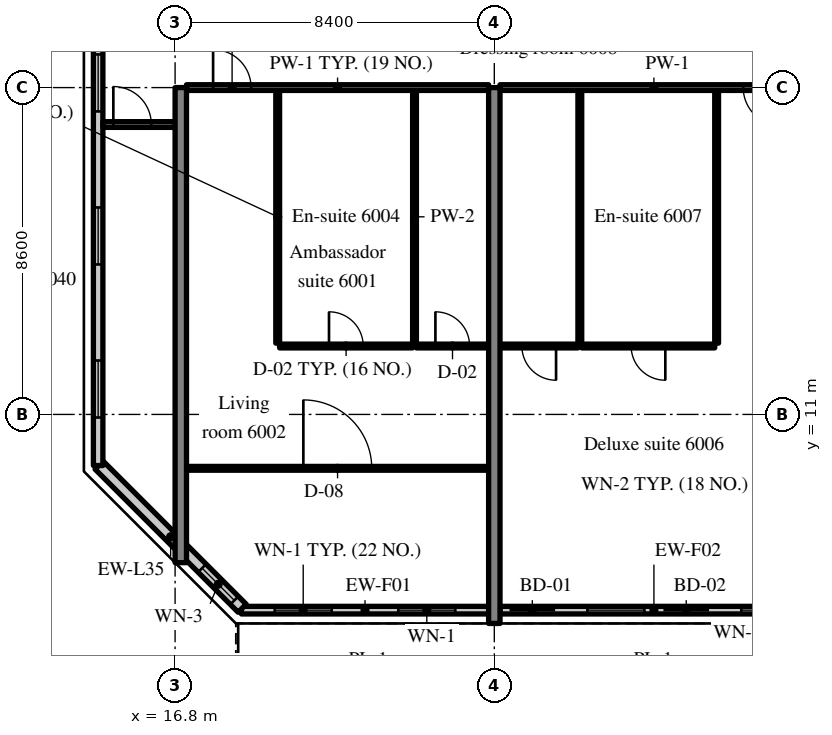
"""IFC4 building model, lengths in metres.
Left out: names, types, materials, properties, quantities, classifications, styles, units other than length and angle.
Written with IfcOpenShell. Run it as: python <this file> out.ifc"""

import sys

from ifc_helpers import new_model, si_unit, direction, frame, frame_2d, origin, place, context, subcontext, project, spatial, rectangle, extrude, source, transform, mapped, element, fill, save


model = new_model("IFC4")
c1 = context("Model", 3, precision=1e-05, world=origin(), true_north=direction((0.0, 1.0)))
c2 = subcontext(c1, "Body", "Model", "MODEL_VIEW")
j1 = project(units=[si_unit("LENGTHUNIT", "METRE"), si_unit("PLANEANGLEUNIT", "RADIAN")], contexts=[c1])
p1 = place(None, origin())
s1 = spatial("IfcSite", under=j1, at=p1, CompositionType="ELEMENT")
p2 = place(p1, origin())
s2 = spatial("IfcBuilding", under=s1, at=p2, CompositionType="ELEMENT")
p3 = place(p2, frame((0.0, 0.0, 249.1)))
s3 = spatial("IfcBuildingStorey", under=s2, at=p3, CompositionType="ELEMENT", Elevation=249.1)
m1 = source(origin(), c2, "Body", "SweptSolid", [
    extrude(rectangle(XDim=12.5, YDim=0.3, at=frame_2d((6.25, 0.0))), origin(), (0.0, 0.0, 1.0), 3.62),
])
p4 = place(p3, frame((16.95, 7.1, 0.0), z_axis=(0.0, 0.0, 1.0), x_axis=(0.0, 1.0, 0.0)))
e1 = element("IfcWall", 1, at=p4, inside=s3, PredefinedType="SHEAR", context=c2, shape_type="MappedRepresentation", body=[
    mapped(m1, transform((0.0, 0.0, 0.0), scale=1.0)),
])
m2 = source(origin(), c2, "Body", "SweptSolid", [
    extrude(rectangle(XDim=14.1, YDim=0.3, at=frame_2d((7.05, 0.0))), origin(), (0.0, 0.0, 1.0), 3.62),
])
p5 = place(p3, frame((25.2, 5.5, 0.0), z_axis=(0.0, 0.0, 1.0), x_axis=(0.0, 1.0, 0.0)))
e2 = element("IfcWall", 2, at=p5, inside=s3, PredefinedType="SHEAR", context=c2, shape_type="MappedRepresentation", body=[
    mapped(m2, transform((0.0, 0.0, 0.0), scale=1.0)),
])
m3 = source(origin(), c2, "Body", "SweptSolid", [
    extrude(rectangle(XDim=6.505, YDim=0.2, at=frame_2d((3.252, 0.0))), origin(), (0.0, 0.0, 1.0), 3.02),
])
p6 = place(p3, frame((18.545, 5.85, 0.0), z_axis=(0.0, 0.0, 1.0), x_axis=(1.0, 0.0, 0.0)))
e3 = element("IfcWall", 3, at=p6, inside=s3, PredefinedType="SOLIDWALL", context=c2, shape_type="MappedRepresentation", body=[
    mapped(m3, transform((0.0, 0.0, 0.0), scale=1.0)),
])
m4 = source(origin(), c2, "Body", "SweptSolid", [
    extrude(rectangle(XDim=1.5, YDim=1.5, at=frame_2d((0.75, 0.75))), frame((0.0, 0.11, 0.0), z_axis=(0.0, -1.0, 0.0), x_axis=(1.0, 0.0, 0.0)), (0.0, 0.0, 1.0), 0.22),
])
p7 = place(p6, frame((0.876, 0.0, 0.9)))
e4 = element("IfcOpeningElement", 4, at=p7, cuts=e3, PredefinedType="OPENING", context=c2, shape_type="MappedRepresentation", body=[
    mapped(m4, transform((0.0, 0.0, 0.0), scale=1.0)),
])
p8 = place(p6, frame((4.129, 0.0, 0.9)))
e5 = element("IfcOpeningElement", 5, at=p8, cuts=e3, PredefinedType="OPENING", context=c2, shape_type="MappedRepresentation", body=[
    mapped(m4, transform((0.0, 0.0, 0.0), scale=1.0)),
])
m5 = source(origin(), c2, "Body", "SweptSolid", [
    extrude(rectangle(XDim=8.1, YDim=0.2, at=frame_2d((4.05, 0.0))), origin(), (0.0, 0.0, 1.0), 3.02),
])
p9 = place(p3, frame((25.35, 5.85, 0.0), z_axis=(0.0, 0.0, 1.0), x_axis=(1.0, 0.0, 0.0)))
e6 = element("IfcWall", 6, at=p9, inside=s3, PredefinedType="SOLIDWALL", context=c2, shape_type="MappedRepresentation", body=[
    mapped(m5, transform((0.0, 0.0, 0.0), scale=1.0)),
])
m6 = source(origin(), c2, "Body", "SweptSolid", [
    extrude(rectangle(XDim=1.2, YDim=2.4, at=frame_2d((0.6, 1.2))), frame((0.0, 0.11, 0.0), z_axis=(0.0, -1.0, 0.0), x_axis=(1.0, 0.0, 0.0)), (0.0, 0.0, 1.0), 0.22),
])
p10 = place(p9, frame((0.25, 0.0, 0.0)))
e7 = element("IfcOpeningElement", 7, at=p10, cuts=e6, PredefinedType="OPENING", context=c2, shape_type="MappedRepresentation", body=[
    mapped(m6, transform((0.0, 0.0, 0.0), scale=1.0)),
])
p11 = place(p9, frame((2.3, 0.0, 0.9)))
e8 = element("IfcOpeningElement", 8, at=p11, cuts=e6, PredefinedType="OPENING", context=c2, shape_type="MappedRepresentation", body=[
    mapped(m4, transform((0.0, 0.0, 0.0), scale=1.0)),
])
p12 = place(p9, frame((4.3, 0.0, 0.0)))
e9 = element("IfcOpeningElement", 9, at=p12, cuts=e6, PredefinedType="OPENING", context=c2, shape_type="MappedRepresentation", body=[
    mapped(m6, transform((0.0, 0.0, 0.0), scale=1.0)),
])
p13 = place(p9, frame((6.35, 0.0, 0.9)))
e10 = element("IfcOpeningElement", 10, at=p13, cuts=e6, PredefinedType="OPENING", context=c2, shape_type="MappedRepresentation", body=[
    mapped(m4, transform((0.0, 0.0, 0.0), scale=1.0)),
])
m7 = source(origin(), c2, "Body", "SweptSolid", [
    extrude(rectangle(XDim=5.326, YDim=0.3, at=frame_2d((2.663, 0.0))), origin(), (0.0, 0.0, 1.0), 3.62),
])
p14 = place(p3, frame((14.8, 9.666, 0.0), z_axis=(0.0, 0.0, 1.0), x_axis=(0.707083859269, -0.707129702361, 0.0)))
e11 = element("IfcWall", 11, at=p14, inside=s3, PredefinedType="SOLIDWALL", context=c2, shape_type="MappedRepresentation", body=[
    mapped(m7, transform((0.0, 0.0, 0.0), scale=1.0)),
])
m8 = source(origin(), c2, "Body", "SweptSolid", [
    extrude(rectangle(XDim=1.2, YDim=1.5, at=frame_2d((0.6, 0.75))), frame((0.0, 0.16, 0.0), z_axis=(0.0, -1.0, 0.0), x_axis=(1.0, 0.0, 0.0)), (0.0, 0.0, 1.0), 0.32),
])
p15 = place(p14, frame((3.833, 0.0, 0.9)))
e12 = element("IfcOpeningElement", 12, at=p15, cuts=e11, PredefinedType="OPENING", context=c2, shape_type="MappedRepresentation", body=[
    mapped(m8, transform((0.0, 0.0, 0.0), scale=1.0)),
])
m9 = source(origin(), c2, "Body", "SweptSolid", [
    extrude(rectangle(XDim=28.189, YDim=0.25, at=frame_2d((14.095, 0.0))), origin(), (0.0, 0.0, 1.0), 3.62),
])
p16 = place(p3, frame((14.775, 37.845, 0.0), z_axis=(0.0, 0.0, 1.0), x_axis=(0.0, -1.0, 0.0)))
e13 = element("IfcWall", 13, at=p16, inside=s3, PredefinedType="SOLIDWALL", context=c2, shape_type="MappedRepresentation", body=[
    mapped(m9, transform((0.0, 0.0, 0.0), scale=1.0)),
])
m10 = source(origin(), c2, "Body", "SweptSolid", [
    extrude(rectangle(XDim=1.5, YDim=1.5, at=frame_2d((0.75, 0.75))), frame((0.0, 0.135, 0.0), z_axis=(0.0, -1.0, 0.0), x_axis=(1.0, 0.0, 0.0)), (0.0, 0.0, 1.0), 0.27),
])
p17 = place(p16, frame((1.263, 0.0, 0.9)))
e14 = element("IfcOpeningElement", 14, at=p17, cuts=e13, PredefinedType="OPENING", context=c2, shape_type="MappedRepresentation", body=[
    mapped(m10, transform((0.0, 0.0, 0.0), scale=1.0)),
])
p18 = place(p16, frame((5.291, 0.0, 0.9)))
e15 = element("IfcOpeningElement", 15, at=p18, cuts=e13, PredefinedType="OPENING", context=c2, shape_type="MappedRepresentation", body=[
    mapped(m10, transform((0.0, 0.0, 0.0), scale=1.0)),
])
p19 = place(p16, frame((9.318, 0.0, 0.9)))
e16 = element("IfcOpeningElement", 16, at=p19, cuts=e13, PredefinedType="OPENING", context=c2, shape_type="MappedRepresentation", body=[
    mapped(m10, transform((0.0, 0.0, 0.0), scale=1.0)),
])
p20 = place(p16, frame((13.345, 0.0, 0.9)))
e17 = element("IfcOpeningElement", 17, at=p20, cuts=e13, PredefinedType="OPENING", context=c2, shape_type="MappedRepresentation", body=[
    mapped(m10, transform((0.0, 0.0, 0.0), scale=1.0)),
])
p21 = place(p16, frame((17.372, 0.0, 0.9)))
e18 = element("IfcOpeningElement", 18, at=p21, cuts=e13, PredefinedType="OPENING", context=c2, shape_type="MappedRepresentation", body=[
    mapped(m10, transform((0.0, 0.0, 0.0), scale=1.0)),
])
p22 = place(p16, frame((21.399, 0.0, 0.9)))
e19 = element("IfcOpeningElement", 19, at=p22, cuts=e13, PredefinedType="OPENING", context=c2, shape_type="MappedRepresentation", body=[
    mapped(m10, transform((0.0, 0.0, 0.0), scale=1.0)),
])
p23 = place(p16, frame((25.426, 0.0, 0.9)))
e20 = element("IfcOpeningElement", 20, at=p23, cuts=e13, PredefinedType="OPENING", context=c2, shape_type="MappedRepresentation", body=[
    mapped(m10, transform((0.0, 0.0, 0.0), scale=1.0)),
])
m11 = source(origin(), c2, "Body", "SweptSolid", [
    extrude(rectangle(XDim=6.65, YDim=0.1, at=frame_2d((3.325, 0.0))), origin(), (0.0, 0.0, 1.0), 3.62),
])
for number, where, z_axis, x_axis in (
    (21, (19.5, 12.875, 0.0), (0.0, 0.0, 1.0), (0.0, 1.0, 0.0)),
    (22, (23.1, 12.875, 0.0), (0.0, 0.0, 1.0), (0.0, 1.0, 0.0)),
):
    element("IfcWall", number, at=place(p3, frame(where, z_axis=z_axis, x_axis=x_axis)), inside=s3, PredefinedType="PARTITIONING", context=c2, shape_type="MappedRepresentation", body=[
        mapped(m11, transform((0.0, 0.0, 0.0), scale=1.0)),
    ])
m12 = source(origin(), c2, "Body", "SweptSolid", [
    extrude(rectangle(XDim=3.5, YDim=0.1, at=frame_2d((1.75, 0.0))), origin(), (0.0, 0.0, 1.0), 3.62),
])
p24 = place(p3, frame((19.55, 12.8, 0.0), z_axis=(0.0, 0.0, 1.0), x_axis=(1.0, 0.0, 0.0)))
e23 = element("IfcWall", 23, at=p24, inside=s3, PredefinedType="PARTITIONING", context=c2, shape_type="MappedRepresentation", body=[
    mapped(m12, transform((0.0, 0.0, 0.0), scale=1.0)),
])
m13 = source(origin(), c2, "Body", "SweptSolid", [
    extrude(rectangle(XDim=0.9, YDim=2.1, at=frame_2d((0.45, 1.05))), frame((0.0, 0.06, 0.0), z_axis=(0.0, -1.0, 0.0), x_axis=(1.0, 0.0, 0.0)), (0.0, 0.0, 1.0), 0.12),
])
p25 = place(p24, frame((1.3, 0.0, 0.0)))
e24 = element("IfcOpeningElement", 24, at=p25, cuts=e23, PredefinedType="OPENING", context=c2, shape_type="MappedRepresentation", body=[
    mapped(m13, transform((0.0, 0.0, 0.0), scale=1.0)),
])
m14 = source(origin(), c2, "Body", "SweptSolid", [
    extrude(rectangle(XDim=1.9, YDim=0.1, at=frame_2d((0.95, 0.0))), origin(), (0.0, 0.0, 1.0), 3.62),
])
p26 = place(p3, frame((23.15, 12.8, 0.0), z_axis=(0.0, 0.0, 1.0), x_axis=(1.0, 0.0, 0.0)))
e25 = element("IfcWall", 25, at=p26, inside=s3, PredefinedType="PARTITIONING", context=c2, shape_type="MappedRepresentation", body=[
    mapped(m14, transform((0.0, 0.0, 0.0), scale=1.0)),
])
p27 = place(p26, frame((0.5, 0.0, 0.0)))
e26 = element("IfcOpeningElement", 26, at=p27, cuts=e25, PredefinedType="OPENING", context=c2, shape_type="MappedRepresentation", body=[
    mapped(m13, transform((0.0, 0.0, 0.0), scale=1.0)),
])
m15 = source(origin(), c2, "Body", "SweptSolid", [
    extrude(rectangle(XDim=7.95, YDim=0.1, at=frame_2d((3.975, 0.0))), origin(), (0.0, 0.0, 1.0), 3.62),
])
p28 = place(p3, frame((17.1, 9.582, 0.0), z_axis=(0.0, 0.0, 1.0), x_axis=(1.0, 0.0, 0.0)))
e27 = element("IfcWall", 27, at=p28, inside=s3, PredefinedType="PARTITIONING", context=c2, shape_type="MappedRepresentation", body=[
    mapped(m15, transform((0.0, 0.0, 0.0), scale=1.0)),
])
m16 = source(origin(), c2, "Body", "SweptSolid", [
    extrude(rectangle(XDim=1.8, YDim=2.1, at=frame_2d((0.9, 1.05))), frame((0.0, 0.06, 0.0), z_axis=(0.0, -1.0, 0.0), x_axis=(1.0, 0.0, 0.0)), (0.0, 0.0, 1.0), 0.12),
])
p29 = place(p28, frame((3.075, 0.0, 0.0)))
e28 = element("IfcOpeningElement", 28, at=p29, cuts=e27, PredefinedType="OPENING", context=c2, shape_type="MappedRepresentation", body=[
    mapped(m16, transform((0.0, 0.0, 0.0), scale=1.0)),
])
m17 = source(origin(), c2, "Body", "SweptSolid", [
    extrude(rectangle(XDim=7.95, YDim=0.15, at=frame_2d((3.975, 0.0))), origin(), (0.0, 0.0, 1.0), 2.92),
])
p30 = place(p3, frame((17.1, 19.6, 0.0), z_axis=(0.0, 0.0, 1.0), x_axis=(1.0, 0.0, 0.0)))
e29 = element("IfcWall", 29, at=p30, inside=s3, PredefinedType="PARTITIONING", context=c2, shape_type="MappedRepresentation", body=[
    mapped(m17, transform((0.0, 0.0, 0.0), scale=1.0)),
])
m18 = source(origin(), c2, "Body", "SweptSolid", [
    extrude(rectangle(XDim=1.0, YDim=2.1, at=frame_2d((0.5, 1.05))), frame((0.0, 0.085, 0.0), z_axis=(0.0, -1.0, 0.0), x_axis=(1.0, 0.0, 0.0)), (0.0, 0.0, 1.0), 0.17),
])
p31 = place(p30, frame((0.7, 0.0, 0.0)))
e30 = element("IfcOpeningElement", 30, at=p31, cuts=e29, PredefinedType="OPENING", context=c2, shape_type="MappedRepresentation", body=[
    mapped(m18, transform((0.0, 0.0, 0.0), scale=1.0)),
])
for number, where, z_axis, x_axis in (
    (31, (31.05, 12.875, 0.0), (0.0, 0.0, 1.0), (0.0, 1.0, 0.0)),
    (32, (27.45, 12.875, 0.0), (0.0, 0.0, 1.0), (0.0, 1.0, 0.0)),
):
    element("IfcWall", number, at=place(p3, frame(where, z_axis=z_axis, x_axis=x_axis)), inside=s3, PredefinedType="PARTITIONING", context=c2, shape_type="MappedRepresentation", body=[
        mapped(m11, transform((0.0, 0.0, 0.0), scale=1.0)),
    ])
p32 = place(p3, frame((27.5, 12.8, 0.0), z_axis=(0.0, 0.0, 1.0), x_axis=(1.0, 0.0, 0.0)))
e33 = element("IfcWall", 33, at=p32, inside=s3, PredefinedType="PARTITIONING", context=c2, shape_type="MappedRepresentation", body=[
    mapped(m12, transform((0.0, 0.0, 0.0), scale=1.0)),
])
p33 = place(p32, frame((1.3, 0.0, 0.0)))
e34 = element("IfcOpeningElement", 34, at=p33, cuts=e33, PredefinedType="OPENING", context=c2, shape_type="MappedRepresentation", body=[
    mapped(m13, transform((0.0, 0.0, 0.0), scale=1.0)),
])
m19 = source(origin(), c2, "Body", "SweptSolid", [
    extrude(rectangle(XDim=2.05, YDim=0.1, at=frame_2d((1.025, 0.0))), origin(), (0.0, 0.0, 1.0), 3.62),
])
p34 = place(p3, frame((25.35, 12.8, 0.0), z_axis=(0.0, 0.0, 1.0), x_axis=(1.0, 0.0, 0.0)))
e35 = element("IfcWall", 35, at=p34, inside=s3, PredefinedType="PARTITIONING", context=c2, shape_type="MappedRepresentation", body=[
    mapped(m19, transform((0.0, 0.0, 0.0), scale=1.0)),
])
p35 = place(p34, frame((0.575, 0.0, 0.0)))
e36 = element("IfcOpeningElement", 36, at=p35, cuts=e35, PredefinedType="OPENING", context=c2, shape_type="MappedRepresentation", body=[
    mapped(m13, transform((0.0, 0.0, 0.0), scale=1.0)),
])
m20 = source(origin(), c2, "Body", "SweptSolid", [
    extrude(rectangle(XDim=8.1, YDim=0.15, at=frame_2d((4.05, 0.0))), origin(), (0.0, 0.0, 1.0), 2.92),
])
p36 = place(p3, frame((25.35, 19.6, 0.0), z_axis=(0.0, 0.0, 1.0), x_axis=(1.0, 0.0, 0.0)))
e37 = element("IfcWall", 37, at=p36, inside=s3, PredefinedType="PARTITIONING", context=c2, shape_type="MappedRepresentation", body=[
    mapped(m20, transform((0.0, 0.0, 0.0), scale=1.0)),
])
p37 = place(p36, frame((6.4, 0.0, 0.0)))
e38 = element("IfcOpeningElement", 38, at=p37, cuts=e37, PredefinedType="OPENING", context=c2, shape_type="MappedRepresentation", body=[
    mapped(m18, transform((0.0, 0.0, 0.0), scale=1.0)),
])
m21 = source(origin(), c2, "Body", "SweptSolid", [
    extrude(rectangle(XDim=1.9, YDim=0.15, at=frame_2d((0.95, 0.0))), origin(), (0.0, 0.0, 1.0), 2.92),
])
p38 = place(p3, frame((14.9, 18.628, 0.0), z_axis=(0.0, 0.0, 1.0), x_axis=(1.0, 0.0, 0.0)))
e39 = element("IfcWall", 39, at=p38, inside=s3, PredefinedType="PARTITIONING", context=c2, shape_type="MappedRepresentation", body=[
    mapped(m21, transform((0.0, 0.0, 0.0), scale=1.0)),
])
p39 = place(p38, frame((0.275, 0.0, 0.0)))
e40 = element("IfcOpeningElement", 40, at=p39, cuts=e39, PredefinedType="OPENING", context=c2, shape_type="MappedRepresentation", body=[
    mapped(m18, transform((0.0, 0.0, 0.0), scale=1.0)),
])
m22 = source(origin(), c2, "Body", "SweptSolid", [
    extrude(rectangle(XDim=1.5, YDim=1.5, at=frame_2d((0.75, 0.75))), frame((0.0, 0.03, 0.0), z_axis=(0.0, -1.0, 0.0), x_axis=(1.0, 0.0, 0.0)), (0.0, 0.0, 1.0), 0.06),
])
p40 = place(p7, origin())
e41 = element("IfcWindow", 41, at=p40, inside=s3, PartitioningType="SINGLE_PANEL", PredefinedType="WINDOW", context=c2, shape_type="MappedRepresentation", body=[
    mapped(m22, transform((0.0, 0.0, 0.0), scale=1.0)),
])
fill(e4, e41)
p41 = place(p8, origin())
e42 = element("IfcWindow", 42, at=p41, inside=s3, PartitioningType="SINGLE_PANEL", PredefinedType="WINDOW", context=c2, shape_type="MappedRepresentation", body=[
    mapped(m22, transform((0.0, 0.0, 0.0), scale=1.0)),
])
fill(e5, e42)
m23 = source(origin(), c2, "Body", "SweptSolid", [
    extrude(rectangle(XDim=1.2, YDim=2.4, at=frame_2d((0.6, 1.2))), frame((0.0, 0.025, 0.0), z_axis=(0.0, -1.0, 0.0), x_axis=(1.0, 0.0, 0.0)), (0.0, 0.0, 1.0), 0.05),
])
p42 = place(p10, origin())
e43 = element("IfcDoor", 43, at=p42, inside=s3, OperationType="SLIDING_TO_LEFT", PredefinedType="DOOR", context=c2, shape_type="MappedRepresentation", body=[
    mapped(m23, transform((0.0, 0.0, 0.0), scale=1.0)),
])
fill(e7, e43)
p43 = place(p11, origin())
e44 = element("IfcWindow", 44, at=p43, inside=s3, PartitioningType="SINGLE_PANEL", PredefinedType="WINDOW", context=c2, shape_type="MappedRepresentation", body=[
    mapped(m22, transform((0.0, 0.0, 0.0), scale=1.0)),
])
fill(e8, e44)
p44 = place(p12, origin())
e45 = element("IfcDoor", 45, at=p44, inside=s3, OperationType="SLIDING_TO_RIGHT", PredefinedType="DOOR", context=c2, shape_type="MappedRepresentation", body=[
    mapped(m23, transform((0.0, 0.0, 0.0), scale=1.0)),
])
fill(e9, e45)
p45 = place(p13, origin())
e46 = element("IfcWindow", 46, at=p45, inside=s3, PartitioningType="SINGLE_PANEL", PredefinedType="WINDOW", context=c2, shape_type="MappedRepresentation", body=[
    mapped(m22, transform((0.0, 0.0, 0.0), scale=1.0)),
])
fill(e10, e46)
m24 = source(origin(), c2, "Body", "SweptSolid", [
    extrude(rectangle(XDim=1.2, YDim=1.5, at=frame_2d((0.6, 0.75))), frame((0.0, 0.03, 0.0), z_axis=(0.0, -1.0, 0.0), x_axis=(1.0, 0.0, 0.0)), (0.0, 0.0, 1.0), 0.06),
])
p46 = place(p15, origin())
e47 = element("IfcWindow", 47, at=p46, inside=s3, PartitioningType="SINGLE_PANEL", PredefinedType="WINDOW", context=c2, shape_type="MappedRepresentation", body=[
    mapped(m24, transform((0.0, 0.0, 0.0), scale=1.0)),
])
fill(e12, e47)
p47 = place(p21, origin())
e48 = element("IfcWindow", 48, at=p47, inside=s3, PartitioningType="SINGLE_PANEL", PredefinedType="WINDOW", context=c2, shape_type="MappedRepresentation", body=[
    mapped(m22, transform((0.0, 0.0, 0.0), scale=1.0)),
])
fill(e18, e48)
p48 = place(p22, origin())
e49 = element("IfcWindow", 49, at=p48, inside=s3, PartitioningType="SINGLE_PANEL", PredefinedType="WINDOW", context=c2, shape_type="MappedRepresentation", body=[
    mapped(m22, transform((0.0, 0.0, 0.0), scale=1.0)),
])
fill(e19, e49)
p49 = place(p23, origin())
e50 = element("IfcWindow", 50, at=p49, inside=s3, PartitioningType="SINGLE_PANEL", PredefinedType="WINDOW", context=c2, shape_type="MappedRepresentation", body=[
    mapped(m22, transform((0.0, 0.0, 0.0), scale=1.0)),
])
fill(e20, e50)
m25 = source(origin(), c2, "Body", "SweptSolid", [
    extrude(rectangle(XDim=0.9, YDim=2.1, at=frame_2d((0.45, 1.05))), frame((0.0, 0.025, 0.0), z_axis=(0.0, -1.0, 0.0), x_axis=(1.0, 0.0, 0.0)), (0.0, 0.0, 1.0), 0.05),
])
p50 = place(p25, origin())
e51 = element("IfcDoor", 51, at=p50, inside=s3, OperationType="SINGLE_SWING_LEFT", PredefinedType="DOOR", context=c2, shape_type="MappedRepresentation", body=[
    mapped(m25, transform((0.0, 0.0, 0.0), scale=1.0)),
])
fill(e24, e51)
p51 = place(p27, origin())
e52 = element("IfcDoor", 52, at=p51, inside=s3, OperationType="SINGLE_SWING_LEFT", PredefinedType="DOOR", context=c2, shape_type="MappedRepresentation", body=[
    mapped(m25, transform((0.0, 0.0, 0.0), scale=1.0)),
])
fill(e26, e52)
m26 = source(origin(), c2, "Body", "SweptSolid", [
    extrude(rectangle(XDim=1.8, YDim=2.1, at=frame_2d((0.9, 1.05))), frame((0.0, 0.025, 0.0), z_axis=(0.0, -1.0, 0.0), x_axis=(1.0, 0.0, 0.0)), (0.0, 0.0, 1.0), 0.05),
])
p52 = place(p29, origin())
e53 = element("IfcDoor", 53, at=p52, inside=s3, OperationType="DOUBLE_DOOR_SINGLE_SWING", PredefinedType="DOOR", context=c2, shape_type="MappedRepresentation", body=[
    mapped(m26, transform((0.0, 0.0, 0.0), scale=1.0)),
])
fill(e28, e53)
m27 = source(origin(), c2, "Body", "SweptSolid", [
    extrude(rectangle(XDim=1.0, YDim=2.1, at=frame_2d((0.5, 1.05))), frame((0.0, 0.025, 0.0), z_axis=(0.0, -1.0, 0.0), x_axis=(1.0, 0.0, 0.0)), (0.0, 0.0, 1.0), 0.05),
])
p53 = place(p31, origin())
e54 = element("IfcDoor", 54, at=p53, inside=s3, OperationType="SINGLE_SWING_LEFT", PredefinedType="DOOR", context=c2, shape_type="MappedRepresentation", body=[
    mapped(m27, transform((0.0, 0.0, 0.0), scale=1.0)),
])
fill(e30, e54)
p54 = place(p33, origin())
e55 = element("IfcDoor", 55, at=p54, inside=s3, OperationType="SINGLE_SWING_RIGHT", PredefinedType="DOOR", context=c2, shape_type="MappedRepresentation", body=[
    mapped(m25, transform((0.0, 0.0, 0.0), scale=1.0)),
])
fill(e34, e55)
p55 = place(p35, origin())
e56 = element("IfcDoor", 56, at=p55, inside=s3, OperationType="SINGLE_SWING_RIGHT", PredefinedType="DOOR", context=c2, shape_type="MappedRepresentation", body=[
    mapped(m25, transform((0.0, 0.0, 0.0), scale=1.0)),
])
fill(e36, e56)
p56 = place(p37, origin())
e57 = element("IfcDoor", 57, at=p56, inside=s3, OperationType="SINGLE_SWING_RIGHT", PredefinedType="DOOR", context=c2, shape_type="MappedRepresentation", body=[
    mapped(m27, transform((0.0, 0.0, 0.0), scale=1.0)),
])
fill(e38, e57)
p57 = place(p39, origin())
e58 = element("IfcDoor", 58, at=p57, inside=s3, OperationType="SINGLE_SWING_LEFT", PredefinedType="DOOR", context=c2, shape_type="MappedRepresentation", body=[
    mapped(m27, transform((0.0, 0.0, 0.0), scale=1.0)),
])
fill(e40, e58)
save(model, sys.argv[1])
